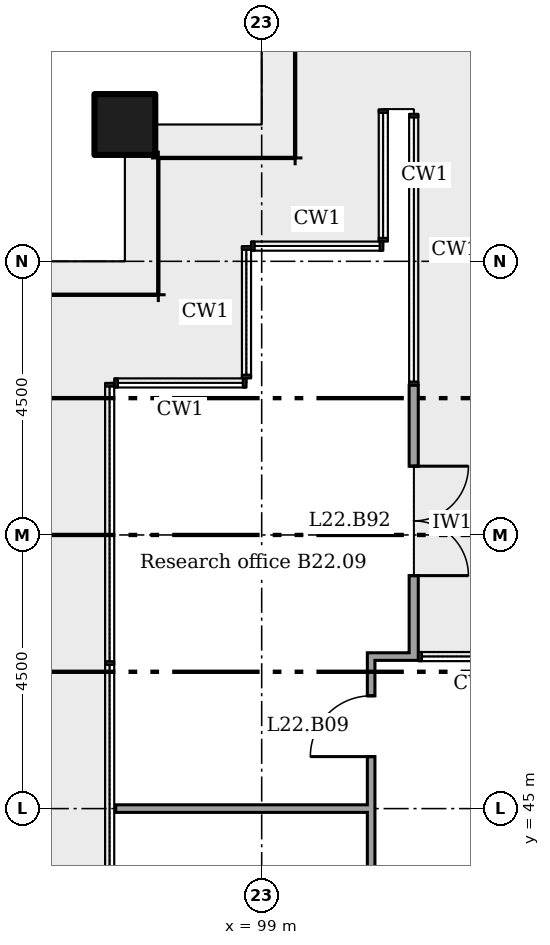
"""IFC4 building model, lengths in metres.
Left out: names, types, materials, properties, quantities, classifications, styles, units other than length and angle.
Written with IfcOpenShell. Run it as: python <this file> out.ifc"""

import sys

from ifc_helpers import new_model, si_unit, direction, frame, frame_2d, origin, origin_2d, place, context, subcontext, project, spatial, rectangle, extrude, element, fill, save


model = new_model("IFC4")
c1 = context("Model", 3, precision=1e-05, world=origin(), true_north=direction((0.0, 1.0)))
c2 = subcontext(c1, "Body", "Model", "MODEL_VIEW")
j1 = project(units=[si_unit("LENGTHUNIT", "METRE"), si_unit("PLANEANGLEUNIT", "RADIAN")], contexts=[c1])
p1 = place(None, origin())
s1 = spatial("IfcSite", under=j1, at=p1, CompositionType="ELEMENT")
p2 = place(p1, origin())
s2 = spatial("IfcBuilding", under=s1, at=p2, CompositionType="ELEMENT")
p3 = place(p2, frame((0.0, 0.0, 92.0)))
s3 = spatial("IfcBuildingStorey", under=s2, at=p3, CompositionType="ELEMENT", Elevation=92.0)
p4 = place(p3, frame((96.75, 56.25, 0.0)))
e1 = element("IfcColumn", 1, at=p4, inside=s3, PredefinedType="COLUMN", context=c2, shape_type="SweptSolid", body=[
    extrude(rectangle(XDim=1.0, YDim=1.0, at=origin_2d()), origin(), (0.0, 0.0, 1.0), 3.6),
])
p5 = place(p3, frame((101.5, 47.438, 0.0), z_axis=(0.0, 0.0, 1.0), x_axis=(0.0, 1.0, 0.0)))
e2 = element("IfcWall", 2, at=p5, inside=s3, PredefinedType="SOLIDWALL", context=c2, shape_type="SweptSolid", body=[
    extrude(rectangle(XDim=4.525, YDim=0.15, at=frame_2d((2.262, 0.0))), origin(), (0.0, 0.0, 1.0), 3.1),
])
p6 = place(p5, frame((1.394, 0.0, 0.0)))
e3 = element("IfcOpeningElement", 3, at=p6, cuts=e2, PredefinedType="OPENING", context=c2, shape_type="SweptSolid", body=[
    extrude(rectangle(XDim=1.8, YDim=2.4, at=frame_2d((0.9, 1.2))), frame((0.0, 0.085, 0.0), z_axis=(0.0, -1.0, 0.0), x_axis=(1.0, 0.0, 0.0)), (0.0, 0.0, 1.0), 0.17),
])
p7 = place(p3, frame((96.6, 45.0, 0.0)))
e4 = element("IfcWall", 4, at=p7, inside=s3, PredefinedType="PARTITIONING", context=c2, shape_type="SweptSolid", body=[
    extrude(rectangle(XDim=4.2, YDim=0.125, at=frame_2d((2.1, 0.0))), origin(), (0.0, 0.0, 1.0), 2.851),
])
p8 = place(p3, frame((100.738, 47.5, 0.0)))
e5 = element("IfcWall", 5, at=p8, inside=s3, PredefinedType="PARTITIONING", context=c2, shape_type="SweptSolid", body=[
    extrude(rectangle(XDim=0.688, YDim=0.125, at=frame_2d((0.344, 0.0))), origin(), (0.0, 0.0, 1.0), 3.45),
])
p9 = place(p3, frame((100.8, 33.363, 0.0), z_axis=(0.0, 0.0, 1.0), x_axis=(0.0, 1.0, 0.0)))
e6 = element("IfcWall", 6, at=p9, inside=s3, PredefinedType="PARTITIONING", context=c2, shape_type="SweptSolid", body=[
    extrude(rectangle(XDim=14.075, YDim=0.125, at=frame_2d((7.038, 0.0))), origin(), (0.0, 0.0, 1.0), 3.45),
])
p10 = place(p9, frame((8.887, 0.0, 0.0)))
e7 = element("IfcOpeningElement", 7, at=p10, cuts=e6, PredefinedType="OPENING", context=c2, shape_type="SweptSolid", body=[
    extrude(rectangle(XDim=1.0, YDim=2.1, at=frame_2d((0.5, 1.05))), frame((0.0, 0.073, 0.0), z_axis=(0.0, -1.0, 0.0), x_axis=(1.0, 0.0, 0.0)), (0.0, 0.0, 1.0), 0.145),
])
p11 = place(p9, frame((3.933, 0.0, 0.0)))
e8 = element("IfcOpeningElement", 8, at=p11, cuts=e6, PredefinedType="OPENING", context=c2, shape_type="SweptSolid", body=[
    extrude(rectangle(XDim=1.0, YDim=2.1, at=frame_2d((0.5, 1.05))), frame((0.0, 0.073, 0.0), z_axis=(0.0, -1.0, 0.0), x_axis=(1.0, 0.0, 0.0)), (0.0, 0.0, 1.0), 0.145),
])
p12 = place(p9, frame((0.927, 0.0, 0.0)))
e9 = element("IfcOpeningElement", 9, at=p12, cuts=e6, PredefinedType="OPENING", context=c2, shape_type="SweptSolid", body=[
    extrude(rectangle(XDim=1.0, YDim=2.1, at=frame_2d((0.5, 1.05))), frame((0.0, 0.073, 0.0), z_axis=(0.0, -1.0, 0.0), x_axis=(1.0, 0.0, 0.0)), (0.0, 0.0, 1.0), 0.145),
])
p13 = place(p9, frame((12.492, 0.0, 0.0)))
e10 = element("IfcOpeningElement", 10, at=p13, cuts=e6, PredefinedType="OPENING", context=c2, shape_type="SweptSolid", body=[
    extrude(rectangle(XDim=1.0, YDim=2.1, at=frame_2d((0.5, 1.05))), frame((0.0, 0.073, 0.0), z_axis=(0.0, -1.0, 0.0), x_axis=(1.0, 0.0, 0.0)), (0.0, 0.0, 1.0), 0.145),
])
p14 = place(p6, frame((1.8, 0.0, 0.0), x_axis=(-1.0, 0.0, 0.0)))
e11 = element("IfcDoor", 11, at=p14, inside=s3, OperationType="DOUBLE_DOOR_DOUBLE_SWING", PredefinedType="NOTDEFINED", context=c2, shape_type="SweptSolid", body=[
    extrude(rectangle(XDim=1.8, YDim=2.4, at=frame_2d((0.9, 1.2))), frame((0.0, 0.025, 0.0), z_axis=(0.0, -1.0, 0.0), x_axis=(1.0, 0.0, 0.0)), (0.0, 0.0, 1.0), 0.05),
])
fill(e3, e11)
p15 = place(p13, origin())
e12 = element("IfcDoor", 12, at=p15, inside=s3, OperationType="SINGLE_SWING_RIGHT", PredefinedType="DOOR", context=c2, shape_type="SweptSolid", body=[
    extrude(rectangle(XDim=1.0, YDim=2.1, at=frame_2d((0.5, 1.05))), frame((0.0, 0.025, 0.0), z_axis=(0.0, -1.0, 0.0), x_axis=(1.0, 0.0, 0.0)), (0.0, 0.0, 1.0), 0.05),
])
fill(e10, e12)
save(model, sys.argv[1])
